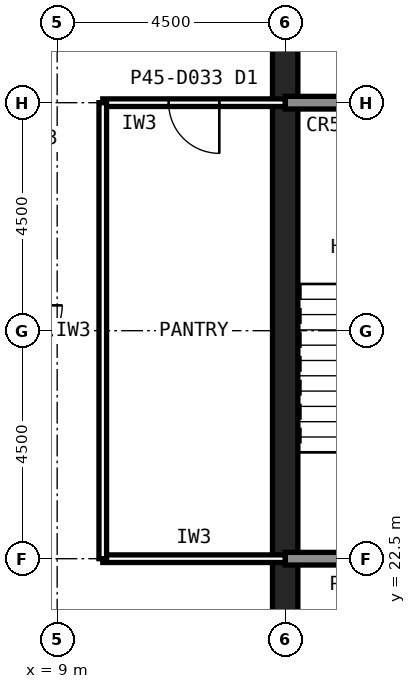
"""IFC4 building model, lengths in metres.
Left out: names, types, materials, properties, quantities, classifications, styles, units other than length and angle.
Written with IfcOpenShell. Run it as: python <this file> out.ifc"""

import sys

from ifc_helpers import new_model, si_unit, direction, frame, frame_2d, origin, place, context, subcontext, project, spatial, rectangle, extrude, element, fill, save


model = new_model("IFC4")
c1 = context("Model", 3, precision=1e-05, world=origin(), true_north=direction((0.0, 1.0)))
c2 = subcontext(c1, "Body", "Model", "MODEL_VIEW")
j1 = project(units=[si_unit("LENGTHUNIT", "METRE"), si_unit("PLANEANGLEUNIT", "RADIAN")], contexts=[c1])
p1 = place(None, origin())
s1 = spatial("IfcSite", under=j1, at=p1, CompositionType="ELEMENT")
p2 = place(p1, origin())
s2 = spatial("IfcBuilding", under=s1, at=p2, CompositionType="ELEMENT")
p3 = place(p2, frame((0.0, 0.0, 191.6)))
s3 = spatial("IfcBuildingStorey", under=s2, at=p3, CompositionType="ELEMENT", Elevation=191.6)
p4 = place(p3, frame((13.5, 40.5, 0.0), z_axis=(0.0, 0.0, 1.0), x_axis=(0.0, -1.0, 0.0)))
e1 = element("IfcWall", 1, at=p4, inside=s3, PredefinedType="SHEAR", context=c2, shape_type="SweptSolid", body=[
    extrude(rectangle(XDim=27.0, YDim=0.5, at=frame_2d((13.5, 0.0))), origin(), (0.0, 0.0, 1.0), 4.0),
])
p5 = place(p4, frame((19.65, 0.0, 0.0)))
e2 = element("IfcOpeningElement", 2, at=p5, cuts=e1, PredefinedType="OPENING", context=c2, shape_type="SweptSolid", body=[
    extrude(rectangle(XDim=1.2, YDim=2.1, at=frame_2d((0.6, 1.05))), frame((0.0, 0.26, 0.0), z_axis=(0.0, -1.0, 0.0), x_axis=(1.0, 0.0, 0.0)), (0.0, 0.0, 1.0), 0.52),
])
p6 = place(p4, frame((5.85, 0.0, 0.0)))
e3 = element("IfcOpeningElement", 3, at=p6, cuts=e1, PredefinedType="OPENING", context=c2, shape_type="SweptSolid", body=[
    extrude(rectangle(XDim=1.8, YDim=2.1, at=frame_2d((0.9, 1.05))), frame((0.0, 0.26, 0.0), z_axis=(0.0, -1.0, 0.0), x_axis=(1.0, 0.0, 0.0)), (0.0, 0.0, 1.0), 0.52),
])
p7 = place(p3, frame((13.5, 22.5, 0.0), z_axis=(0.0, 0.0, 1.0), x_axis=(1.0, 0.0, 0.0)))
e4 = element("IfcWall", 4, at=p7, inside=s3, PredefinedType="SOLIDWALL", context=c2, shape_type="SweptSolid", body=[
    extrude(rectangle(XDim=27.0, YDim=0.25, at=frame_2d((13.5, 0.0))), origin(), (0.0, 0.0, 1.0), 3.84),
])
p8 = place(p7, frame((1.65, 0.0, 0.0)))
e5 = element("IfcOpeningElement", 5, at=p8, cuts=e4, PredefinedType="OPENING", context=c2, shape_type="SweptSolid", body=[
    extrude(rectangle(XDim=1.2, YDim=2.1, at=frame_2d((0.6, 1.05))), frame((0.0, 0.135, 0.0), z_axis=(0.0, -1.0, 0.0), x_axis=(1.0, 0.0, 0.0)), (0.0, 0.0, 1.0), 0.27),
])
p9 = place(p7, frame((6.025, 0.0, 0.0)))
e6 = element("IfcOpeningElement", 6, at=p9, cuts=e4, PredefinedType="OPENING", context=c2, shape_type="SweptSolid", body=[
    extrude(rectangle(XDim=1.0, YDim=2.1, at=frame_2d((0.5, 1.05))), frame((0.0, 0.135, 0.0), z_axis=(0.0, -1.0, 0.0), x_axis=(1.0, 0.0, 0.0)), (0.0, 0.0, 1.0), 0.27),
])
p10 = place(p7, frame((10.525, 0.0, 0.0)))
e7 = element("IfcOpeningElement", 7, at=p10, cuts=e4, PredefinedType="OPENING", context=c2, shape_type="SweptSolid", body=[
    extrude(rectangle(XDim=1.0, YDim=2.1, at=frame_2d((0.5, 1.05))), frame((0.0, 0.135, 0.0), z_axis=(0.0, -1.0, 0.0), x_axis=(1.0, 0.0, 0.0)), (0.0, 0.0, 1.0), 0.27),
])
p11 = place(p7, frame((19.75, 0.0, 0.0)))
e8 = element("IfcOpeningElement", 8, at=p11, cuts=e4, PredefinedType="OPENING", context=c2, shape_type="SweptSolid", body=[
    extrude(rectangle(XDim=1.0, YDim=2.1, at=frame_2d((0.5, 1.05))), frame((0.0, 0.135, 0.0), z_axis=(0.0, -1.0, 0.0), x_axis=(1.0, 0.0, 0.0)), (0.0, 0.0, 1.0), 0.27),
])
p12 = place(p7, frame((15.05, 0.0, 0.0)))
e9 = element("IfcOpeningElement", 9, at=p12, cuts=e4, PredefinedType="OPENING", context=c2, shape_type="SweptSolid", body=[
    extrude(rectangle(XDim=1.4, YDim=2.4, at=frame_2d((0.7, 1.2))), frame((0.0, 0.135, 0.0), z_axis=(0.0, -1.0, 0.0), x_axis=(1.0, 0.0, 0.0)), (0.0, 0.0, 1.0), 0.27),
])
p13 = place(p3, frame((13.5, 31.5, 0.0), z_axis=(0.0, 0.0, 1.0), x_axis=(1.0, 0.0, 0.0)))
e10 = element("IfcWall", 10, at=p13, inside=s3, PredefinedType="SOLIDWALL", context=c2, shape_type="SweptSolid", body=[
    extrude(rectangle(XDim=27.0, YDim=0.25, at=frame_2d((13.5, 0.0))), origin(), (0.0, 0.0, 1.0), 3.84),
])
p14 = place(p13, frame((24.15, 0.0, 0.0)))
e11 = element("IfcOpeningElement", 11, at=p14, cuts=e10, PredefinedType="OPENING", context=c2, shape_type="SweptSolid", body=[
    extrude(rectangle(XDim=1.2, YDim=2.1, at=frame_2d((0.6, 1.05))), frame((0.0, 0.135, 0.0), z_axis=(0.0, -1.0, 0.0), x_axis=(1.0, 0.0, 0.0)), (0.0, 0.0, 1.0), 0.27),
])
p15 = place(p13, frame((15.3, 0.0, 0.0)))
e12 = element("IfcOpeningElement", 12, at=p15, cuts=e10, PredefinedType="OPENING", context=c2, shape_type="SweptSolid", body=[
    extrude(rectangle(XDim=0.9, YDim=2.1, at=frame_2d((0.45, 1.05))), frame((0.0, 0.135, 0.0), z_axis=(0.0, -1.0, 0.0), x_axis=(1.0, 0.0, 0.0)), (0.0, 0.0, 1.0), 0.27),
])
p16 = place(p13, frame((19.8, 0.0, 0.0)))
e13 = element("IfcOpeningElement", 13, at=p16, cuts=e10, PredefinedType="OPENING", context=c2, shape_type="SweptSolid", body=[
    extrude(rectangle(XDim=0.9, YDim=2.1, at=frame_2d((0.45, 1.05))), frame((0.0, 0.135, 0.0), z_axis=(0.0, -1.0, 0.0), x_axis=(1.0, 0.0, 0.0)), (0.0, 0.0, 1.0), 0.27),
])
p17 = place(p3, frame((9.9, 22.5, 0.0), z_axis=(0.0, 0.0, 1.0), x_axis=(1.0, 0.0, 0.0)))
e14 = element("IfcWall", 14, at=p17, inside=s3, PredefinedType="PARTITIONING", context=c2, shape_type="SweptSolid", body=[
    extrude(rectangle(XDim=3.6, YDim=0.15, at=frame_2d((1.8, 0.0))), origin(), (0.0, 0.0, 1.0), 2.989),
])
p18 = place(p3, frame((13.5, 31.5, 0.0), z_axis=(0.0, 0.0, 1.0), x_axis=(-1.0, 0.0, 0.0)))
e15 = element("IfcWall", 15, at=p18, inside=s3, PredefinedType="PARTITIONING", context=c2, shape_type="SweptSolid", body=[
    extrude(rectangle(XDim=3.6, YDim=0.15, at=frame_2d((1.8, 0.0))), origin(), (0.0, 0.0, 1.0), 2.989),
])
p19 = place(p18, frame((1.3, 0.0, 0.0)))
e16 = element("IfcOpeningElement", 16, at=p19, cuts=e15, PredefinedType="OPENING", context=c2, shape_type="SweptSolid", body=[
    extrude(rectangle(XDim=1.0, YDim=2.1, at=frame_2d((0.5, 1.05))), frame((0.0, 0.085, 0.0), z_axis=(0.0, -1.0, 0.0), x_axis=(1.0, 0.0, 0.0)), (0.0, 0.0, 1.0), 0.17),
])
p20 = place(p3, frame((9.9, 31.5, 0.0), z_axis=(0.0, 0.0, 1.0), x_axis=(0.0, -1.0, 0.0)))
e17 = element("IfcWall", 17, at=p20, inside=s3, PredefinedType="PARTITIONING", context=c2, shape_type="SweptSolid", body=[
    extrude(rectangle(XDim=9.0, YDim=0.15, at=frame_2d((4.5, 0.0))), origin(), (0.0, 0.0, 1.0), 3.84),
])
p21 = place(p19, origin())
e18 = element("IfcDoor", 18, at=p21, inside=s3, OperationType="SINGLE_SWING_LEFT", PredefinedType="DOOR", context=c2, shape_type="SweptSolid", body=[
    extrude(rectangle(XDim=1.0, YDim=2.1, at=frame_2d((0.5, 1.05))), frame((0.0, 0.025, 0.0), z_axis=(0.0, -1.0, 0.0), x_axis=(1.0, 0.0, 0.0)), (0.0, 0.0, 1.0), 0.05),
])
fill(e16, e18)
save(model, sys.argv[1])
